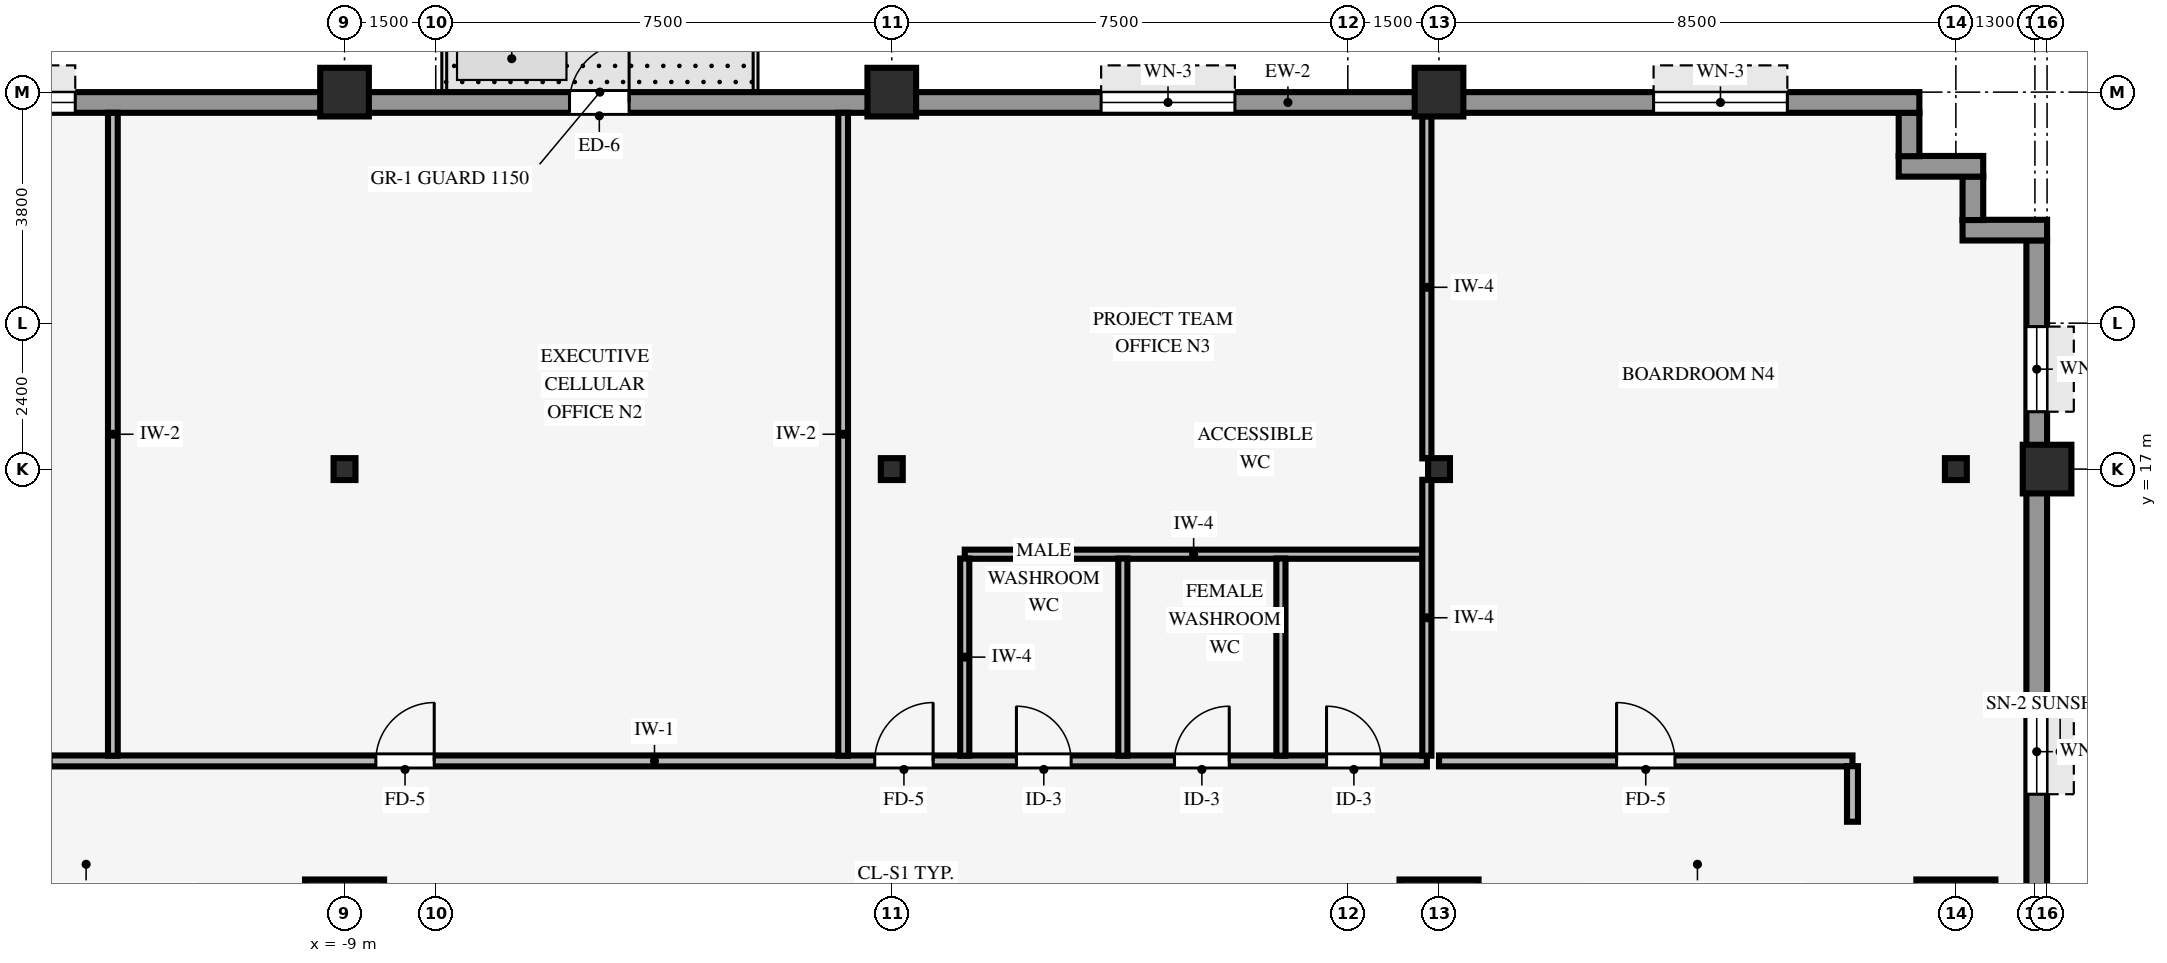
"""IFC4 building model, lengths in metres.
Left out: names, types, materials, properties, quantities, classifications, styles, units other than length and angle.
Written with IfcOpenShell. Run it as: python <this file> out.ifc"""

import sys

from ifc_helpers import new_model, si_unit, direction, frame, frame_2d, origin, origin_2d, place, context, subcontext, project, spatial, rectangle, hollow_rectangle, i_section, extrude, source, transform, mapped, element, fill, save


model = new_model("IFC4")
c1 = context("Model", 3, precision=1e-05, world=origin(), true_north=direction((0.0, 1.0)))
c2 = subcontext(c1, "Body", "Model", "MODEL_VIEW")
j1 = project(units=[si_unit("LENGTHUNIT", "METRE"), si_unit("PLANEANGLEUNIT", "RADIAN")], contexts=[c1])
p1 = place(None, origin())
s1 = spatial("IfcSite", under=j1, at=p1, CompositionType="ELEMENT")
p2 = place(p1, origin())
s2 = spatial("IfcBuilding", under=s1, at=p2, CompositionType="ELEMENT")
p3 = place(p2, frame((0.0, 0.0, 27.6)))
s3 = spatial("IfcBuildingStorey", under=s2, at=p3, CompositionType="ELEMENT", Elevation=27.6)
for number, where, z_axis, x_axis in (
    (1, (-9.0, 9.6, 0.0), (0.0, 0.0, 1.0), (1.0, 0.0, 0.0)),
    (2, (9.0, 9.6, 0.0), (0.0, 0.0, 1.0), (1.0, 0.0, 0.0)),
    (3, (17.5, 9.6, 0.0), (0.0, 0.0, 1.0), (1.0, 0.0, 0.0)),
):
    element("IfcColumn", number, at=place(p3, frame(where, z_axis=z_axis, x_axis=x_axis)), inside=s3, PredefinedType="COLUMN", context=c2, shape_type="SweptSolid", body=[
        extrude(rectangle(XDim=1.3, YDim=1.3, at=origin_2d()), origin(), (0.0, 0.0, 1.0), 3.37),
    ])
p4 = place(p3, frame((19.0, 17.0, 0.0), z_axis=(0.0, 0.0, 1.0), x_axis=(1.0, 0.0, 0.0)))
e4 = element("IfcColumn", 4, at=p4, inside=s3, PredefinedType="COLUMN", context=c2, shape_type="SweptSolid", body=[
    extrude(hollow_rectangle(XDim=0.8, YDim=0.8, WallThickness=0.055, InnerFilletRadius=0.055, OuterFilletRadius=0.11, at=origin_2d()), origin(), (0.0, 0.0, 1.0), 3.37),
])
for number, where, z_axis, x_axis in (
    (5, (-9.0, 23.2, -0.4), (0.0, 0.0, 1.0), (1.0, 0.0, 0.0)),
    (6, (0.0, 23.2, -0.4), (0.0, 0.0, 1.0), (1.0, 0.0, 0.0)),
    (7, (9.0, 23.2, -0.4), (0.0, 0.0, 1.0), (1.0, 0.0, 0.0)),
):
    element("IfcColumn", number, at=place(p3, frame(where, z_axis=z_axis, x_axis=x_axis)), inside=s3, PredefinedType="COLUMN", context=c2, shape_type="SweptSolid", body=[
        extrude(hollow_rectangle(XDim=0.8, YDim=0.8, WallThickness=0.055, InnerFilletRadius=0.055, OuterFilletRadius=0.11, at=origin_2d()), origin(), (0.0, 0.0, 1.0), 3.77),
    ])
p5 = place(p3, frame((0.0, 17.0, 0.0), z_axis=(0.0, 0.0, 1.0), x_axis=(1.0, 0.0, 0.0)))
e8 = element("IfcColumn", 8, at=p5, inside=s3, PredefinedType="COLUMN", context=c2, shape_type="SweptSolid", body=[
    extrude(i_section(OverallWidth=0.36, OverallDepth=0.36, WebThickness=0.021, FlangeThickness=0.021, FilletRadius=0.018, at=origin_2d()), origin(), (0.0, 0.0, 1.0), 3.37),
])
for number, where, z_axis, x_axis in (
    (9, (-9.0, 17.0, -0.4), (0.0, 0.0, 1.0), (1.0, 0.0, 0.0)),
    (10, (9.0, 17.0, -0.4), (0.0, 0.0, 1.0), (1.0, 0.0, 0.0)),
    (11, (17.5, 17.0, -0.4), (0.0, 0.0, 1.0), (1.0, 0.0, 0.0)),
):
    element("IfcColumn", number, at=place(p3, frame(where, z_axis=z_axis, x_axis=x_axis)), inside=s3, PredefinedType="COLUMN", context=c2, shape_type="SweptSolid", body=[
        extrude(i_section(OverallWidth=0.36, OverallDepth=0.36, WebThickness=0.021, FlangeThickness=0.021, FilletRadius=0.018, at=origin_2d()), origin(), (0.0, 0.0, 1.0), 3.77),
    ])
p6 = place(p3, frame((18.83, -20.764, 0.0), z_axis=(0.0, 0.0, 1.0), x_axis=(0.0, 1.0, 0.0)))
e12 = element("IfcWall", 12, at=p6, inside=s3, PredefinedType="STANDARD", context=c2, shape_type="SweptSolid", body=[
    extrude(rectangle(XDim=41.528, YDim=0.34, at=frame_2d((20.764, 0.0))), origin(), (0.0, 0.0, 1.0), 2.705),
])
p7 = place(p6, frame((7.914, 0.0, 0.0), z_axis=(0.0, 0.0, 1.0), x_axis=(-1.0, 0.0, 0.0)))
e13 = element("IfcOpeningElement", 13, at=p7, cuts=e12, PredefinedType="OPENING", context=c2, shape_type="SweptSolid", body=[
    extrude(rectangle(XDim=1.05, YDim=2.1, at=frame_2d((0.525, 1.05))), frame((0.0, 0.18, 0.0), z_axis=(0.0, -1.0, 0.0), x_axis=(1.0, 0.0, 0.0)), (0.0, 0.0, 1.0), 0.36),
])
p8 = place(p6, frame((1.42, 0.0, 0.8)))
e14 = element("IfcOpeningElement", 14, at=p8, cuts=e12, PredefinedType="OPENING", context=c2, shape_type="SweptSolid", body=[
    extrude(rectangle(XDim=1.4, YDim=1.65, at=frame_2d((0.7, 0.825))), frame((0.0, 0.18, 0.0), z_axis=(0.0, -1.0, 0.0), x_axis=(1.0, 0.0, 0.0)), (0.0, 0.0, 1.0), 0.36),
])
p9 = place(p6, frame((32.417, 0.0, 0.8)))
e15 = element("IfcOpeningElement", 15, at=p9, cuts=e12, PredefinedType="OPENING", context=c2, shape_type="SweptSolid", body=[
    extrude(rectangle(XDim=1.4, YDim=1.65, at=frame_2d((0.7, 0.825))), frame((0.0, 0.18, 0.0), z_axis=(0.0, -1.0, 0.0), x_axis=(1.0, 0.0, 0.0)), (0.0, 0.0, 1.0), 0.36),
])
p10 = place(p6, frame((38.708, 0.0, 0.8)))
e16 = element("IfcOpeningElement", 16, at=p10, cuts=e12, PredefinedType="OPENING", context=c2, shape_type="SweptSolid", body=[
    extrude(rectangle(XDim=1.4, YDim=1.65, at=frame_2d((0.7, 0.825))), frame((0.0, 0.18, 0.0), z_axis=(0.0, -1.0, 0.0), x_axis=(1.0, 0.0, 0.0)), (0.0, 0.0, 1.0), 0.36),
])
p11 = place(p3, frame((17.61, 20.93, 0.0), z_axis=(0.0, 0.0, 1.0), x_axis=(1.0, 0.0, 0.0)))
e17 = element("IfcWall", 17, at=p11, inside=s3, PredefinedType="STANDARD", context=c2, shape_type="SweptSolid", body=[
    extrude(rectangle(XDim=1.39, YDim=0.34, at=frame_2d((0.695, 0.0))), origin(), (0.0, 0.0, 1.0), 3.36),
])
p12 = place(p3, frame((17.78, 21.096, 0.0), z_axis=(0.0, 0.0, 1.0), x_axis=(0.0, 1.0, 0.0)))
e18 = element("IfcWall", 18, at=p12, inside=s3, PredefinedType="STANDARD", context=c2, shape_type="SweptSolid", body=[
    extrude(rectangle(XDim=0.718, YDim=0.34, at=frame_2d((0.359, 0.0))), origin(), (0.0, 0.0, 1.0), 3.36),
])
p13 = place(p3, frame((16.56, 21.98, 0.0), z_axis=(0.0, 0.0, 1.0), x_axis=(1.0, 0.0, 0.0)))
e19 = element("IfcWall", 19, at=p13, inside=s3, PredefinedType="STANDARD", context=c2, shape_type="SweptSolid", body=[
    extrude(rectangle(XDim=1.39, YDim=0.34, at=frame_2d((0.695, 0.0))), origin(), (0.0, 0.0, 1.0), 3.36),
])
p14 = place(p3, frame((16.73, 22.146, 0.0), z_axis=(0.0, 0.0, 1.0), x_axis=(0.0, 1.0, 0.0)))
e20 = element("IfcWall", 20, at=p14, inside=s3, PredefinedType="STANDARD", context=c2, shape_type="SweptSolid", body=[
    extrude(rectangle(XDim=0.718, YDim=0.34, at=frame_2d((0.359, 0.0))), origin(), (0.0, 0.0, 1.0), 3.36),
])
p15 = place(p3, frame((-16.9, 23.03, 0.0), z_axis=(0.0, 0.0, 1.0), x_axis=(1.0, 0.0, 0.0)))
e21 = element("IfcWall", 21, at=p15, inside=s3, PredefinedType="STANDARD", context=c2, shape_type="SweptSolid", body=[
    extrude(rectangle(XDim=33.8, YDim=0.34, at=frame_2d((16.9, 0.0))), origin(), (0.0, 0.0, 1.0), 2.705),
])
p16 = place(p15, frame((11.6, 0.0, 0.0)))
e22 = element("IfcOpeningElement", 22, at=p16, cuts=e21, PredefinedType="OPENING", context=c2, shape_type="SweptSolid", body=[
    extrude(rectangle(XDim=0.98, YDim=2.15, at=frame_2d((0.49, 1.075))), frame((0.0, 0.18, 0.0), z_axis=(0.0, -1.0, 0.0), x_axis=(1.0, 0.0, 0.0)), (0.0, 0.0, 1.0), 0.36),
])
p17 = place(p15, frame((1.271, 0.0, 0.8)))
e23 = element("IfcOpeningElement", 23, at=p17, cuts=e21, PredefinedType="OPENING", context=c2, shape_type="SweptSolid", body=[
    extrude(rectangle(XDim=2.2, YDim=1.65, at=frame_2d((1.1, 0.825))), frame((0.0, 0.18, 0.0), z_axis=(0.0, -1.0, 0.0), x_axis=(1.0, 0.0, 0.0)), (0.0, 0.0, 1.0), 0.36),
])
p18 = place(p15, frame((20.343, 0.0, 0.8)))
e24 = element("IfcOpeningElement", 24, at=p18, cuts=e21, PredefinedType="OPENING", context=c2, shape_type="SweptSolid", body=[
    extrude(rectangle(XDim=2.2, YDim=1.65, at=frame_2d((1.1, 0.825))), frame((0.0, 0.18, 0.0), z_axis=(0.0, -1.0, 0.0), x_axis=(1.0, 0.0, 0.0)), (0.0, 0.0, 1.0), 0.36),
])
p19 = place(p15, frame((29.429, 0.0, 0.8)))
e25 = element("IfcOpeningElement", 25, at=p19, cuts=e21, PredefinedType="OPENING", context=c2, shape_type="SweptSolid", body=[
    extrude(rectangle(XDim=2.2, YDim=1.65, at=frame_2d((1.1, 0.825))), frame((0.0, 0.18, 0.0), z_axis=(0.0, -1.0, 0.0), x_axis=(1.0, 0.0, 0.0)), (0.0, 0.0, 1.0), 0.36),
])
p20 = place(p3, frame((-15.8, 12.2, 0.0), z_axis=(0.0, 0.0, 1.0), x_axis=(1.0, 0.0, 0.0)))
e26 = element("IfcWall", 26, at=p20, inside=s3, PredefinedType="PARTITIONING", context=c2, shape_type="SweptSolid", body=[
    extrude(rectangle(XDim=24.6, YDim=0.18, at=frame_2d((12.3, 0.0))), origin(), (0.0, 0.0, 1.0), 3.36),
])
p21 = place(p20, frame((7.315, 0.0, 0.0)))
e27 = element("IfcOpeningElement", 27, at=p21, cuts=e26, PredefinedType="OPENING", context=c2, shape_type="SweptSolid", body=[
    extrude(rectangle(XDim=0.96, YDim=2.1, at=frame_2d((0.48, 1.05))), frame((0.0, 0.1, 0.0), z_axis=(0.0, -1.0, 0.0), x_axis=(1.0, 0.0, 0.0)), (0.0, 0.0, 1.0), 0.2),
])
p22 = place(p20, frame((1.015, 0.0, 0.0)))
e28 = element("IfcOpeningElement", 28, at=p22, cuts=e26, PredefinedType="OPENING", context=c2, shape_type="SweptSolid", body=[
    extrude(rectangle(XDim=0.96, YDim=2.1, at=frame_2d((0.48, 1.05))), frame((0.0, 0.1, 0.0), z_axis=(0.0, -1.0, 0.0), x_axis=(1.0, 0.0, 0.0)), (0.0, 0.0, 1.0), 0.2),
])
p23 = place(p20, frame((20.45, 0.0, 0.0)))
e29 = element("IfcOpeningElement", 29, at=p23, cuts=e26, PredefinedType="OPENING", context=c2, shape_type="SweptSolid", body=[
    extrude(rectangle(XDim=0.9, YDim=2.1, at=frame_2d((0.45, 1.05))), frame((0.0, 0.1, 0.0), z_axis=(0.0, -1.0, 0.0), x_axis=(1.0, 0.0, 0.0)), (0.0, 0.0, 1.0), 0.2),
])
p24 = place(p20, frame((17.85, 0.0, 0.0)))
e30 = element("IfcOpeningElement", 30, at=p24, cuts=e26, PredefinedType="OPENING", context=c2, shape_type="SweptSolid", body=[
    extrude(rectangle(XDim=0.9, YDim=2.1, at=frame_2d((0.45, 1.05))), frame((0.0, 0.1, 0.0), z_axis=(0.0, -1.0, 0.0), x_axis=(1.0, 0.0, 0.0)), (0.0, 0.0, 1.0), 0.2),
])
p25 = place(p20, frame((22.95, 0.0, 0.0)))
e31 = element("IfcOpeningElement", 31, at=p25, cuts=e26, PredefinedType="OPENING", context=c2, shape_type="SweptSolid", body=[
    extrude(rectangle(XDim=0.9, YDim=2.1, at=frame_2d((0.45, 1.05))), frame((0.0, 0.1, 0.0), z_axis=(0.0, -1.0, 0.0), x_axis=(1.0, 0.0, 0.0)), (0.0, 0.0, 1.0), 0.2),
])
p26 = place(p20, frame((15.52, 0.0, 0.0)))
e32 = element("IfcOpeningElement", 32, at=p26, cuts=e26, PredefinedType="OPENING", context=c2, shape_type="SweptSolid", body=[
    extrude(rectangle(XDim=0.96, YDim=2.1, at=frame_2d((0.48, 1.05))), frame((0.0, 0.1, 0.0), z_axis=(0.0, -1.0, 0.0), x_axis=(1.0, 0.0, 0.0)), (0.0, 0.0, 1.0), 0.2),
])
p27 = place(p3, frame((9.0, 12.2, 0.0), z_axis=(0.0, 0.0, 1.0), x_axis=(1.0, 0.0, 0.0)))
e33 = element("IfcWall", 33, at=p27, inside=s3, PredefinedType="PARTITIONING", context=c2, shape_type="SweptSolid", body=[
    extrude(rectangle(XDim=6.8, YDim=0.18, at=frame_2d((3.4, 0.0))), origin(), (0.0, 0.0, 1.0), 3.36),
])
p28 = place(p27, frame((2.92, 0.0, 0.0)))
e34 = element("IfcOpeningElement", 34, at=p28, cuts=e33, PredefinedType="OPENING", context=c2, shape_type="SweptSolid", body=[
    extrude(rectangle(XDim=0.96, YDim=2.1, at=frame_2d((0.48, 1.05))), frame((0.0, 0.1, 0.0), z_axis=(0.0, -1.0, 0.0), x_axis=(1.0, 0.0, 0.0)), (0.0, 0.0, 1.0), 0.2),
])
p29 = place(p3, frame((1.2, 15.6, 0.0), z_axis=(0.0, 0.0, 1.0), x_axis=(1.0, 0.0, 0.0)))
e35 = element("IfcWall", 35, at=p29, inside=s3, PredefinedType="PARTITIONING", context=c2, shape_type="SweptSolid", body=[
    extrude(rectangle(XDim=7.529, YDim=0.15, at=frame_2d((3.765, 0.0))), origin(), (0.0, 0.0, 1.0), 3.36),
])
for number, where, z_axis, x_axis in (
    (36, (-12.81, 12.286, 0.0), (0.0, 0.0, 1.0), (0.0, 1.0, 0.0)),
    (37, (-0.8, 12.286, 0.0), (0.0, 0.0, 1.0), (0.0, 1.0, 0.0)),
):
    element("IfcWall", number, at=place(p3, frame(where, z_axis=z_axis, x_axis=x_axis)), inside=s3, PredefinedType="PARTITIONING", context=c2, shape_type="SweptSolid", body=[
        extrude(rectangle(XDim=10.574, YDim=0.16, at=frame_2d((5.287, 0.0))), origin(), (0.0, 0.0, 1.0), 3.36),
    ])
for number, where, z_axis, x_axis in (
    (38, (1.2, 12.286, 0.0), (0.0, 0.0, 1.0), (0.0, 1.0, 0.0)),
    (39, (3.8, 12.286, 0.0), (0.0, 0.0, 1.0), (0.0, 1.0, 0.0)),
    (40, (6.4, 12.286, 0.0), (0.0, 0.0, 1.0), (0.0, 1.0, 0.0)),
):
    element("IfcWall", number, at=place(p3, frame(where, z_axis=z_axis, x_axis=x_axis)), inside=s3, PredefinedType="PARTITIONING", context=c2, shape_type="SweptSolid", body=[
        extrude(rectangle(XDim=3.243, YDim=0.15, at=frame_2d((1.622, 0.0))), origin(), (0.0, 0.0, 1.0), 3.36),
    ])
p30 = place(p3, frame((8.8, 12.286, 0.0), z_axis=(0.0, 0.0, 1.0), x_axis=(0.0, 1.0, 0.0)))
e41 = element("IfcWall", 41, at=p30, inside=s3, PredefinedType="PARTITIONING", context=c2, shape_type="SweptSolid", body=[
    extrude(rectangle(XDim=4.538, YDim=0.15, at=frame_2d((2.269, 0.0))), origin(), (0.0, 0.0, 1.0), 2.738),
])
p31 = place(p3, frame((8.8, 17.176, 0.0), z_axis=(0.0, 0.0, 1.0), x_axis=(0.0, 1.0, 0.0)))
e42 = element("IfcWall", 42, at=p31, inside=s3, PredefinedType="PARTITIONING", context=c2, shape_type="SweptSolid", body=[
    extrude(rectangle(XDim=5.628, YDim=0.15, at=frame_2d((2.814, 0.0))), origin(), (0.0, 0.0, 1.0), 2.738),
])
p32 = place(p3, frame((15.8, 11.2, 0.0), z_axis=(0.0, 0.0, 1.0), x_axis=(0.0, 1.0, 0.0)))
e43 = element("IfcWall", 43, at=p32, inside=s3, PredefinedType="PARTITIONING", context=c2, shape_type="SweptSolid", body=[
    extrude(rectangle(XDim=0.914, YDim=0.18, at=frame_2d((0.457, 0.0))), origin(), (0.0, 0.0, 1.0), 3.36),
])
m1 = source(origin(), c2, "Body", "SweptSolid", [
    extrude(rectangle(XDim=1.4, YDim=1.65, at=frame_2d((0.7, 0.825))), frame((0.0, 0.03, 0.0), z_axis=(0.0, -1.0, 0.0), x_axis=(1.0, 0.0, 0.0)), (0.0, 0.0, 1.0), 0.06),
])
p33 = place(p9, origin())
e44 = element("IfcWindow", 44, at=p33, inside=s3, PartitioningType="SINGLE_PANEL", PredefinedType="WINDOW", context=c2, shape_type="MappedRepresentation", body=[
    mapped(m1, transform((0.0, 0.0, 0.0), scale=1.0)),
])
fill(e15, e44)
p34 = place(p10, origin())
e45 = element("IfcWindow", 45, at=p34, inside=s3, PartitioningType="SINGLE_PANEL", PredefinedType="WINDOW", context=c2, shape_type="MappedRepresentation", body=[
    mapped(m1, transform((0.0, 0.0, 0.0), scale=1.0)),
])
fill(e16, e45)
m2 = source(origin(), c2, "Body", "SweptSolid", [
    extrude(rectangle(XDim=0.98, YDim=2.15, at=frame_2d((0.49, 1.075))), frame((0.0, 0.025, 0.0), z_axis=(0.0, -1.0, 0.0), x_axis=(1.0, 0.0, 0.0)), (0.0, 0.0, 1.0), 0.05),
])
p35 = place(p16, origin())
e46 = element("IfcDoor", 46, at=p35, inside=s3, OperationType="SINGLE_SWING_RIGHT", PredefinedType="DOOR", context=c2, shape_type="MappedRepresentation", body=[
    mapped(m2, transform((0.0, 0.0, 0.0), scale=1.0)),
])
fill(e22, e46)
m3 = source(origin(), c2, "Body", "SweptSolid", [
    extrude(rectangle(XDim=2.2, YDim=1.65, at=frame_2d((1.1, 0.825))), frame((0.0, 0.03, 0.0), z_axis=(0.0, -1.0, 0.0), x_axis=(1.0, 0.0, 0.0)), (0.0, 0.0, 1.0), 0.06),
])
p36 = place(p17, origin())
e47 = element("IfcWindow", 47, at=p36, inside=s3, PartitioningType="SINGLE_PANEL", PredefinedType="WINDOW", context=c2, shape_type="MappedRepresentation", body=[
    mapped(m3, transform((0.0, 0.0, 0.0), scale=1.0)),
])
fill(e23, e47)
p37 = place(p18, origin())
e48 = element("IfcWindow", 48, at=p37, inside=s3, PartitioningType="SINGLE_PANEL", PredefinedType="WINDOW", context=c2, shape_type="MappedRepresentation", body=[
    mapped(m3, transform((0.0, 0.0, 0.0), scale=1.0)),
])
fill(e24, e48)
p38 = place(p19, origin())
e49 = element("IfcWindow", 49, at=p38, inside=s3, PartitioningType="SINGLE_PANEL", PredefinedType="WINDOW", context=c2, shape_type="MappedRepresentation", body=[
    mapped(m3, transform((0.0, 0.0, 0.0), scale=1.0)),
])
fill(e25, e49)
m4 = source(origin(), c2, "Body", "SweptSolid", [
    extrude(rectangle(XDim=0.96, YDim=2.1, at=frame_2d((0.48, 1.05))), frame((0.0, 0.025, 0.0), z_axis=(0.0, -1.0, 0.0), x_axis=(1.0, 0.0, 0.0)), (0.0, 0.0, 1.0), 0.05),
])
p39 = place(p21, origin())
e50 = element("IfcDoor", 50, at=p39, inside=s3, OperationType="SINGLE_SWING_RIGHT", PredefinedType="DOOR", context=c2, shape_type="MappedRepresentation", body=[
    mapped(m4, transform((0.0, 0.0, 0.0), scale=1.0)),
])
fill(e27, e50)
p40 = place(p28, origin())
e51 = element("IfcDoor", 51, at=p40, inside=s3, OperationType="SINGLE_SWING_LEFT", PredefinedType="DOOR", context=c2, shape_type="MappedRepresentation", body=[
    mapped(m4, transform((0.0, 0.0, 0.0), scale=1.0)),
])
fill(e34, e51)
m5 = source(origin(), c2, "Body", "SweptSolid", [
    extrude(rectangle(XDim=0.9, YDim=2.1, at=frame_2d((0.45, 1.05))), frame((0.0, 0.025, 0.0), z_axis=(0.0, -1.0, 0.0), x_axis=(1.0, 0.0, 0.0)), (0.0, 0.0, 1.0), 0.05),
])
p41 = place(p23, origin())
e52 = element("IfcDoor", 52, at=p41, inside=s3, OperationType="SINGLE_SWING_RIGHT", PredefinedType="DOOR", context=c2, shape_type="MappedRepresentation", body=[
    mapped(m5, transform((0.0, 0.0, 0.0), scale=1.0)),
])
fill(e29, e52)
p42 = place(p24, origin())
e53 = element("IfcDoor", 53, at=p42, inside=s3, OperationType="SINGLE_SWING_LEFT", PredefinedType="DOOR", context=c2, shape_type="MappedRepresentation", body=[
    mapped(m5, transform((0.0, 0.0, 0.0), scale=1.0)),
])
fill(e30, e53)
p43 = place(p25, origin())
e54 = element("IfcDoor", 54, at=p43, inside=s3, OperationType="SINGLE_SWING_LEFT", PredefinedType="DOOR", context=c2, shape_type="MappedRepresentation", body=[
    mapped(m5, transform((0.0, 0.0, 0.0), scale=1.0)),
])
fill(e31, e54)
p44 = place(p26, origin())
e55 = element("IfcDoor", 55, at=p44, inside=s3, OperationType="SINGLE_SWING_RIGHT", PredefinedType="DOOR", context=c2, shape_type="MappedRepresentation", body=[
    mapped(m4, transform((0.0, 0.0, 0.0), scale=1.0)),
])
fill(e32, e55)
save(model, sys.argv[1])
